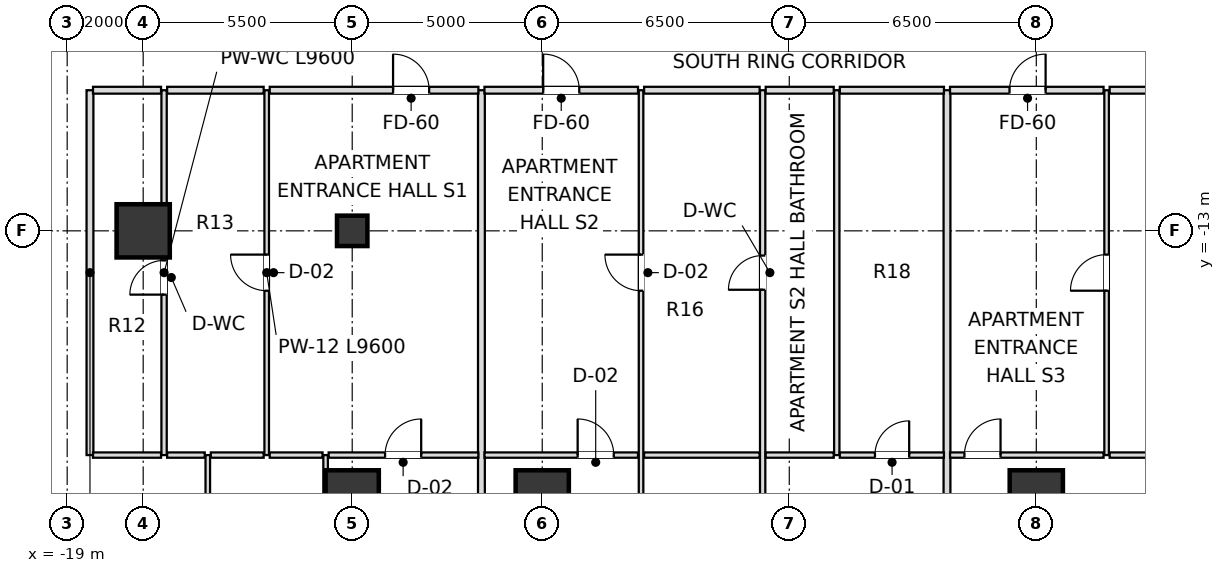
"""IFC4 building model, lengths in metres.
Left out: names, types, materials, properties, quantities, classifications, styles, units other than length and angle.
Written with IfcOpenShell. Run it as: python <this file> out.ifc"""

import sys

from ifc_helpers import new_model, si_unit, direction, frame, frame_2d, origin, origin_2d, place, context, subcontext, project, spatial, rectangle, extrude, element, fill, save


model = new_model("IFC4")
c1 = context("Model", 3, precision=1e-05, world=origin(), true_north=direction((0.0, 1.0)))
c2 = subcontext(c1, "Body", "Model", "MODEL_VIEW")
j1 = project(units=[si_unit("LENGTHUNIT", "METRE"), si_unit("PLANEANGLEUNIT", "RADIAN")], contexts=[c1])
p1 = place(None, origin())
s1 = spatial("IfcSite", under=j1, at=p1, CompositionType="ELEMENT")
p2 = place(p1, origin())
s2 = spatial("IfcBuilding", under=s1, at=p2, CompositionType="ELEMENT")
p3 = place(p2, frame((0.0, 0.0, 27.6)))
s3 = spatial("IfcBuildingStorey", under=s2, at=p3, CompositionType="ELEMENT", Elevation=27.6)
for number, where, z_axis, x_axis in (
    (1, (-11.5, -20.0, 0.0), (0.0, 0.0, 1.0), (1.0, 0.0, 0.0)),
    (2, (-6.5, -20.0, 0.0), (0.0, 0.0, 1.0), (1.0, 0.0, 0.0)),
    (3, (6.5, -20.0, 0.0), (0.0, 0.0, 1.0), (1.0, 0.0, 0.0)),
    (4, (-17.0, -13.0, 0.0), (0.0, 0.0, 1.0), (1.0, 0.0, 0.0)),
):
    element("IfcColumn", number, at=place(p3, frame(where, z_axis=z_axis, x_axis=x_axis)), inside=s3, PredefinedType="USERDEFINED", context=c2, shape_type="SweptSolid", body=[
        extrude(rectangle(XDim=1.4, YDim=1.4, at=origin_2d()), origin(), (0.0, 0.0, 1.0), 4.8),
    ])
p4 = place(p3, frame((-11.5, -13.0, 0.0), z_axis=(0.0, 0.0, 1.0), x_axis=(1.0, 0.0, 0.0)))
e5 = element("IfcColumn", 5, at=p4, inside=s3, PredefinedType="COLUMN", context=c2, shape_type="SweptSolid", body=[
    extrude(rectangle(XDim=0.8, YDim=0.8, at=origin_2d()), origin(), (0.0, 0.0, 1.0), 4.8),
])
p5 = place(p3, frame((-18.4, -18.9, 0.0), z_axis=(0.0, 0.0, 1.0), x_axis=(0.0, 1.0, 0.0)))
e6 = element("IfcWall", 6, at=p5, inside=s3, PredefinedType="PARTITIONING", context=c2, shape_type="SweptSolid", body=[
    extrude(rectangle(XDim=9.6, YDim=0.18, at=frame_2d((4.8, 0.0))), origin(), (0.0, 0.0, 1.0), 3.936),
])
p6 = place(p3, frame((-16.45, -18.9, 0.0), z_axis=(0.0, 0.0, 1.0), x_axis=(0.0, 1.0, 0.0)))
e7 = element("IfcWall", 7, at=p6, inside=s3, PredefinedType="PARTITIONING", context=c2, shape_type="SweptSolid", body=[
    extrude(rectangle(XDim=9.6, YDim=0.14, at=frame_2d((4.8, 0.0))), origin(), (0.0, 0.0, 1.0), 3.936),
])
p7 = place(p6, frame((4.222, 0.0, 0.0)))
e8 = element("IfcOpeningElement", 8, at=p7, cuts=e7, PredefinedType="OPENING", context=c2, shape_type="SweptSolid", body=[
    extrude(rectangle(XDim=0.9, YDim=2.1, at=frame_2d((0.45, 1.05))), frame((0.0, 0.08, 0.0), z_axis=(0.0, -1.0, 0.0), x_axis=(1.0, 0.0, 0.0)), (0.0, 0.0, 1.0), 0.16),
])
p8 = place(p3, frame((-15.3, -24.9, 0.0), z_axis=(0.0, 0.0, 1.0), x_axis=(0.0, 1.0, 0.0)))
e9 = element("IfcWall", 9, at=p8, inside=s3, PredefinedType="PARTITIONING", context=c2, shape_type="SweptSolid", body=[
    extrude(rectangle(XDim=6.0, YDim=0.12, at=frame_2d((3.0, 0.0))), origin(), (0.0, 0.0, 1.0), 3.936),
])
p9 = place(p8, frame((2.55, 0.0, 0.0)))
e10 = element("IfcOpeningElement", 10, at=p9, cuts=e9, PredefinedType="OPENING", context=c2, shape_type="SweptSolid", body=[
    extrude(rectangle(XDim=0.9, YDim=2.1, at=frame_2d((0.45, 1.05))), frame((0.0, 0.07, 0.0), z_axis=(0.0, -1.0, 0.0), x_axis=(1.0, 0.0, 0.0)), (0.0, 0.0, 1.0), 0.14),
])
p10 = place(p3, frame((-13.75, -18.9, 0.0), z_axis=(0.0, 0.0, 1.0), x_axis=(0.0, 1.0, 0.0)))
e11 = element("IfcWall", 11, at=p10, inside=s3, PredefinedType="PARTITIONING", context=c2, shape_type="SweptSolid", body=[
    extrude(rectangle(XDim=9.6, YDim=0.12, at=frame_2d((4.8, 0.0))), origin(), (0.0, 0.0, 1.0), 3.936),
])
p11 = place(p10, frame((4.325, 0.0, 0.0)))
e12 = element("IfcOpeningElement", 12, at=p11, cuts=e11, PredefinedType="OPENING", context=c2, shape_type="SweptSolid", body=[
    extrude(rectangle(XDim=0.95, YDim=2.1, at=frame_2d((0.475, 1.05))), frame((0.0, 0.07, 0.0), z_axis=(0.0, -1.0, 0.0), x_axis=(1.0, 0.0, 0.0)), (0.0, 0.0, 1.0), 0.14),
])
p12 = place(p3, frame((-12.2, -24.9, 0.0), z_axis=(0.0, 0.0, 1.0), x_axis=(0.0, 1.0, 0.0)))
e13 = element("IfcWall", 13, at=p12, inside=s3, PredefinedType="PARTITIONING", context=c2, shape_type="SweptSolid", body=[
    extrude(rectangle(XDim=6.0, YDim=0.12, at=frame_2d((3.0, 0.0))), origin(), (0.0, 0.0, 1.0), 3.936),
])
p13 = place(p12, frame((2.55, 0.0, 0.0)))
e14 = element("IfcOpeningElement", 14, at=p13, cuts=e13, PredefinedType="OPENING", context=c2, shape_type="SweptSolid", body=[
    extrude(rectangle(XDim=0.9, YDim=2.1, at=frame_2d((0.45, 1.05))), frame((0.0, 0.07, 0.0), z_axis=(0.0, -1.0, 0.0), x_axis=(1.0, 0.0, 0.0)), (0.0, 0.0, 1.0), 0.14),
])
p14 = place(p3, frame((-8.1, -24.9, 0.0), z_axis=(0.0, 0.0, 1.0), x_axis=(0.0, 1.0, 0.0)))
e15 = element("IfcWall", 15, at=p14, inside=s3, PredefinedType="PARTITIONING", context=c2, shape_type="SweptSolid", body=[
    extrude(rectangle(XDim=15.6, YDim=0.18, at=frame_2d((7.8, 0.0))), origin(), (0.0, 0.0, 1.0), 4.016),
])
p15 = place(p3, frame((-3.9, -24.9, 0.0), z_axis=(0.0, 0.0, 1.0), x_axis=(0.0, 1.0, 0.0)))
e16 = element("IfcWall", 16, at=p15, inside=s3, PredefinedType="PARTITIONING", context=c2, shape_type="SweptSolid", body=[
    extrude(rectangle(XDim=15.6, YDim=0.12, at=frame_2d((7.8, 0.0))), origin(), (0.0, 0.0, 1.0), 4.016),
])
p16 = place(p15, frame((10.325, 0.0, 0.0)))
e17 = element("IfcOpeningElement", 17, at=p16, cuts=e16, PredefinedType="OPENING", context=c2, shape_type="SweptSolid", body=[
    extrude(rectangle(XDim=0.95, YDim=2.1, at=frame_2d((0.475, 1.05))), frame((0.0, 0.07, 0.0), z_axis=(0.0, -1.0, 0.0), x_axis=(1.0, 0.0, 0.0)), (0.0, 0.0, 1.0), 0.14),
])
p17 = place(p15, frame((2.55, 0.0, 0.0)))
e18 = element("IfcOpeningElement", 18, at=p17, cuts=e16, PredefinedType="OPENING", context=c2, shape_type="SweptSolid", body=[
    extrude(rectangle(XDim=0.9, YDim=2.1, at=frame_2d((0.45, 1.05))), frame((0.0, 0.07, 0.0), z_axis=(0.0, -1.0, 0.0), x_axis=(1.0, 0.0, 0.0)), (0.0, 0.0, 1.0), 0.14),
])
p18 = place(p3, frame((-0.7, -24.9, 0.0), z_axis=(0.0, 0.0, 1.0), x_axis=(0.0, 1.0, 0.0)))
e19 = element("IfcWall", 19, at=p18, inside=s3, PredefinedType="PARTITIONING", context=c2, shape_type="SweptSolid", body=[
    extrude(rectangle(XDim=15.6, YDim=0.14, at=frame_2d((7.8, 0.0))), origin(), (0.0, 0.0, 1.0), 4.016),
])
p19 = place(p18, frame((10.35, 0.0, 0.0)))
e20 = element("IfcOpeningElement", 20, at=p19, cuts=e19, PredefinedType="OPENING", context=c2, shape_type="SweptSolid", body=[
    extrude(rectangle(XDim=0.9, YDim=2.1, at=frame_2d((0.45, 1.05))), frame((0.0, 0.08, 0.0), z_axis=(0.0, -1.0, 0.0), x_axis=(1.0, 0.0, 0.0)), (0.0, 0.0, 1.0), 0.16),
])
p20 = place(p18, frame((2.55, 0.0, 0.0)))
e21 = element("IfcOpeningElement", 21, at=p20, cuts=e19, PredefinedType="OPENING", context=c2, shape_type="SweptSolid", body=[
    extrude(rectangle(XDim=0.9, YDim=2.1, at=frame_2d((0.45, 1.05))), frame((0.0, 0.08, 0.0), z_axis=(0.0, -1.0, 0.0), x_axis=(1.0, 0.0, 0.0)), (0.0, 0.0, 1.0), 0.16),
])
p21 = place(p3, frame((1.25, -18.9, 0.0), z_axis=(0.0, 0.0, 1.0), x_axis=(0.0, 1.0, 0.0)))
e22 = element("IfcWall", 22, at=p21, inside=s3, PredefinedType="PARTITIONING", context=c2, shape_type="SweptSolid", body=[
    extrude(rectangle(XDim=9.6, YDim=0.14, at=frame_2d((4.8, 0.0))), origin(), (0.0, 0.0, 1.0), 4.148),
])
p22 = place(p3, frame((4.15, -24.9, 0.0), z_axis=(0.0, 0.0, 1.0), x_axis=(0.0, 1.0, 0.0)))
e23 = element("IfcWall", 23, at=p22, inside=s3, PredefinedType="PARTITIONING", context=c2, shape_type="SweptSolid", body=[
    extrude(rectangle(XDim=15.6, YDim=0.18, at=frame_2d((7.8, 0.0))), origin(), (0.0, 0.0, 1.0), 4.016),
])
p23 = place(p3, frame((8.35, -18.9, 0.0), z_axis=(0.0, 0.0, 1.0), x_axis=(0.0, 1.0, 0.0)))
e24 = element("IfcWall", 24, at=p23, inside=s3, PredefinedType="PARTITIONING", context=c2, shape_type="SweptSolid", body=[
    extrude(rectangle(XDim=9.6, YDim=0.12, at=frame_2d((4.8, 0.0))), origin(), (0.0, 0.0, 1.0), 4.016),
])
p24 = place(p23, frame((4.325, 0.0, 0.0)))
e25 = element("IfcOpeningElement", 25, at=p24, cuts=e24, PredefinedType="OPENING", context=c2, shape_type="SweptSolid", body=[
    extrude(rectangle(XDim=0.95, YDim=2.1, at=frame_2d((0.475, 1.05))), frame((0.0, 0.07, 0.0), z_axis=(0.0, -1.0, 0.0), x_axis=(1.0, 0.0, 0.0)), (0.0, 0.0, 1.0), 0.14),
])
p25 = place(p3, frame((-18.32, -18.9, 0.0), z_axis=(0.0, 0.0, 1.0), x_axis=(1.0, 0.0, 0.0)))
e26 = element("IfcWall", 26, at=p25, inside=s3, PredefinedType="PARTITIONING", context=c2, shape_type="SweptSolid", body=[
    extrude(rectangle(XDim=1.79, YDim=0.14, at=frame_2d((0.895, 0.0))), origin(), (0.0, 0.0, 1.0), 3.936),
])
p26 = place(p3, frame((-16.37, -18.9, 0.0), z_axis=(0.0, 0.0, 1.0), x_axis=(1.0, 0.0, 0.0)))
e27 = element("IfcWall", 27, at=p26, inside=s3, PredefinedType="PARTITIONING", context=c2, shape_type="SweptSolid", body=[
    extrude(rectangle(XDim=0.99, YDim=0.14, at=frame_2d((0.495, 0.0))), origin(), (0.0, 0.0, 1.0), 3.936),
])
for number, where, z_axis, x_axis in (
    (28, (-15.22, -18.9, 0.0), (0.0, 0.0, 1.0), (1.0, 0.0, 0.0)),
    (29, (-13.67, -18.9, 0.0), (0.0, 0.0, 1.0), (1.0, 0.0, 0.0)),
):
    element("IfcWall", number, at=place(p3, frame(where, z_axis=z_axis, x_axis=x_axis)), inside=s3, PredefinedType="PARTITIONING", context=c2, shape_type="SweptSolid", body=[
        extrude(rectangle(XDim=1.39, YDim=0.14, at=frame_2d((0.695, 0.0))), origin(), (0.0, 0.0, 1.0), 3.936),
    ])
p27 = place(p3, frame((-12.12, -18.9, 0.0), z_axis=(0.0, 0.0, 1.0), x_axis=(1.0, 0.0, 0.0)))
e30 = element("IfcWall", 30, at=p27, inside=s3, PredefinedType="PARTITIONING", context=c2, shape_type="SweptSolid", body=[
    extrude(rectangle(XDim=3.94, YDim=0.14, at=frame_2d((1.97, 0.0))), origin(), (0.0, 0.0, 1.0), 3.936),
])
p28 = place(p27, frame((1.485, 0.0, 0.0)))
e31 = element("IfcOpeningElement", 31, at=p28, cuts=e30, PredefinedType="OPENING", context=c2, shape_type="SweptSolid", body=[
    extrude(rectangle(XDim=0.95, YDim=2.1, at=frame_2d((0.475, 1.05))), frame((0.0, 0.08, 0.0), z_axis=(0.0, -1.0, 0.0), x_axis=(1.0, 0.0, 0.0)), (0.0, 0.0, 1.0), 0.16),
])
p29 = place(p3, frame((-8.02, -18.9, 0.0), z_axis=(0.0, 0.0, 1.0), x_axis=(1.0, 0.0, 0.0)))
e32 = element("IfcWall", 32, at=p29, inside=s3, PredefinedType="PARTITIONING", context=c2, shape_type="SweptSolid", body=[
    extrude(rectangle(XDim=4.04, YDim=0.14, at=frame_2d((2.02, 0.0))), origin(), (0.0, 0.0, 1.0), 4.016),
])
p30 = place(p29, frame((2.452, 0.0, 0.0)))
e33 = element("IfcOpeningElement", 33, at=p30, cuts=e32, PredefinedType="OPENING", context=c2, shape_type="SweptSolid", body=[
    extrude(rectangle(XDim=0.95, YDim=2.1, at=frame_2d((0.475, 1.05))), frame((0.0, 0.08, 0.0), z_axis=(0.0, -1.0, 0.0), x_axis=(1.0, 0.0, 0.0)), (0.0, 0.0, 1.0), 0.16),
])
p31 = place(p3, frame((-3.82, -18.9, 0.0), z_axis=(0.0, 0.0, 1.0), x_axis=(1.0, 0.0, 0.0)))
e34 = element("IfcWall", 34, at=p31, inside=s3, PredefinedType="PARTITIONING", context=c2, shape_type="SweptSolid", body=[
    extrude(rectangle(XDim=3.04, YDim=0.14, at=frame_2d((1.52, 0.0))), origin(), (0.0, 0.0, 1.0), 4.58),
])
p32 = place(p3, frame((-0.62, -18.9, 0.0), z_axis=(0.0, 0.0, 1.0), x_axis=(1.0, 0.0, 0.0)))
e35 = element("IfcWall", 35, at=p32, inside=s3, PredefinedType="PARTITIONING", context=c2, shape_type="SweptSolid", body=[
    extrude(rectangle(XDim=1.79, YDim=0.14, at=frame_2d((0.895, 0.0))), origin(), (0.0, 0.0, 1.0), 4.58),
])
p33 = place(p3, frame((1.33, -18.9, 0.0), z_axis=(0.0, 0.0, 1.0), x_axis=(1.0, 0.0, 0.0)))
e36 = element("IfcWall", 36, at=p33, inside=s3, PredefinedType="PARTITIONING", context=c2, shape_type="SweptSolid", body=[
    extrude(rectangle(XDim=2.74, YDim=0.14, at=frame_2d((1.37, 0.0))), origin(), (0.0, 0.0, 1.0), 4.58),
])
p34 = place(p33, frame((0.925, 0.0, 0.0)))
e37 = element("IfcOpeningElement", 37, at=p34, cuts=e36, PredefinedType="OPENING", context=c2, shape_type="SweptSolid", body=[
    extrude(rectangle(XDim=0.9, YDim=2.1, at=frame_2d((0.45, 1.05))), frame((0.0, 0.08, 0.0), z_axis=(0.0, -1.0, 0.0), x_axis=(1.0, 0.0, 0.0)), (0.0, 0.0, 1.0), 0.16),
])
p35 = place(p3, frame((4.23, -18.9, 0.0), z_axis=(0.0, 0.0, 1.0), x_axis=(1.0, 0.0, 0.0)))
e38 = element("IfcWall", 38, at=p35, inside=s3, PredefinedType="PARTITIONING", context=c2, shape_type="SweptSolid", body=[
    extrude(rectangle(XDim=4.04, YDim=0.14, at=frame_2d((2.02, 0.0))), origin(), (0.0, 0.0, 1.0), 4.016),
])
p36 = place(p35, frame((0.379, 0.0, 0.0)))
e39 = element("IfcOpeningElement", 39, at=p36, cuts=e38, PredefinedType="OPENING", context=c2, shape_type="SweptSolid", body=[
    extrude(rectangle(XDim=0.95, YDim=2.1, at=frame_2d((0.475, 1.05))), frame((0.0, 0.08, 0.0), z_axis=(0.0, -1.0, 0.0), x_axis=(1.0, 0.0, 0.0)), (0.0, 0.0, 1.0), 0.16),
])
p37 = place(p3, frame((8.43, -18.9, 0.0), z_axis=(0.0, 0.0, 1.0), x_axis=(1.0, 0.0, 0.0)))
e40 = element("IfcWall", 40, at=p37, inside=s3, PredefinedType="PARTITIONING", context=c2, shape_type="SweptSolid", body=[
    extrude(rectangle(XDim=1.34, YDim=0.14, at=frame_2d((0.67, 0.0))), origin(), (0.0, 0.0, 1.0), 4.58),
])
p38 = place(p3, frame((-18.32, -9.3, 0.0), z_axis=(0.0, 0.0, 1.0), x_axis=(1.0, 0.0, 0.0)))
e41 = element("IfcWall", 41, at=p38, inside=s3, PredefinedType="PARTITIONING", context=c2, shape_type="SweptSolid", body=[
    extrude(rectangle(XDim=1.79, YDim=0.18, at=frame_2d((0.895, 0.0))), origin(), (0.0, 0.0, 1.0), 4.016),
])
p39 = place(p3, frame((-16.37, -9.3, 0.0), z_axis=(0.0, 0.0, 1.0), x_axis=(1.0, 0.0, 0.0)))
e42 = element("IfcWall", 42, at=p39, inside=s3, PredefinedType="PARTITIONING", context=c2, shape_type="SweptSolid", body=[
    extrude(rectangle(XDim=2.54, YDim=0.18, at=frame_2d((1.27, 0.0))), origin(), (0.0, 0.0, 1.0), 4.58),
])
p40 = place(p3, frame((-13.67, -9.3, 0.0), z_axis=(0.0, 0.0, 1.0), x_axis=(1.0, 0.0, 0.0)))
e43 = element("IfcWall", 43, at=p40, inside=s3, PredefinedType="PARTITIONING", context=c2, shape_type="SweptSolid", body=[
    extrude(rectangle(XDim=5.49, YDim=0.18, at=frame_2d((2.745, 0.0))), origin(), (0.0, 0.0, 1.0), 4.58),
])
p41 = place(p40, frame((3.245, 0.0, 0.0)))
e44 = element("IfcOpeningElement", 44, at=p41, cuts=e43, PredefinedType="OPENING", context=c2, shape_type="SweptSolid", body=[
    extrude(rectangle(XDim=0.95, YDim=2.15, at=frame_2d((0.475, 1.075))), frame((0.0, 0.1, 0.0), z_axis=(0.0, -1.0, 0.0), x_axis=(1.0, 0.0, 0.0)), (0.0, 0.0, 1.0), 0.2),
])
p42 = place(p3, frame((-8.02, -9.3, 0.0), z_axis=(0.0, 0.0, 1.0), x_axis=(1.0, 0.0, 0.0)))
e45 = element("IfcWall", 45, at=p42, inside=s3, PredefinedType="PARTITIONING", context=c2, shape_type="SweptSolid", body=[
    extrude(rectangle(XDim=4.04, YDim=0.18, at=frame_2d((2.02, 0.0))), origin(), (0.0, 0.0, 1.0), 4.016),
])
p43 = place(p42, frame((1.545, 0.0, 0.0)))
e46 = element("IfcOpeningElement", 46, at=p43, cuts=e45, PredefinedType="OPENING", context=c2, shape_type="SweptSolid", body=[
    extrude(rectangle(XDim=0.95, YDim=2.15, at=frame_2d((0.475, 1.075))), frame((0.0, 0.1, 0.0), z_axis=(0.0, -1.0, 0.0), x_axis=(1.0, 0.0, 0.0)), (0.0, 0.0, 1.0), 0.2),
])
p44 = place(p3, frame((-3.82, -9.3, 0.0), z_axis=(0.0, 0.0, 1.0), x_axis=(1.0, 0.0, 0.0)))
e47 = element("IfcWall", 47, at=p44, inside=s3, PredefinedType="PARTITIONING", context=c2, shape_type="SweptSolid", body=[
    extrude(rectangle(XDim=3.04, YDim=0.18, at=frame_2d((1.52, 0.0))), origin(), (0.0, 0.0, 1.0), 4.58),
])
p45 = place(p3, frame((-0.62, -9.3, 0.0), z_axis=(0.0, 0.0, 1.0), x_axis=(1.0, 0.0, 0.0)))
e48 = element("IfcWall", 48, at=p45, inside=s3, PredefinedType="PARTITIONING", context=c2, shape_type="SweptSolid", body=[
    extrude(rectangle(XDim=1.79, YDim=0.18, at=frame_2d((0.895, 0.0))), origin(), (0.0, 0.0, 1.0), 4.58),
])
p46 = place(p3, frame((1.33, -9.3, 0.0), z_axis=(0.0, 0.0, 1.0), x_axis=(1.0, 0.0, 0.0)))
e49 = element("IfcWall", 49, at=p46, inside=s3, PredefinedType="PARTITIONING", context=c2, shape_type="SweptSolid", body=[
    extrude(rectangle(XDim=2.74, YDim=0.18, at=frame_2d((1.37, 0.0))), origin(), (0.0, 0.0, 1.0), 4.58),
])
p47 = place(p3, frame((4.23, -9.3, 0.0), z_axis=(0.0, 0.0, 1.0), x_axis=(1.0, 0.0, 0.0)))
e50 = element("IfcWall", 50, at=p47, inside=s3, PredefinedType="PARTITIONING", context=c2, shape_type="SweptSolid", body=[
    extrude(rectangle(XDim=4.04, YDim=0.18, at=frame_2d((2.02, 0.0))), origin(), (0.0, 0.0, 1.0), 4.016),
])
p48 = place(p47, frame((1.565, 0.0, 0.0)))
e51 = element("IfcOpeningElement", 51, at=p48, cuts=e50, PredefinedType="OPENING", context=c2, shape_type="SweptSolid", body=[
    extrude(rectangle(XDim=0.95, YDim=2.15, at=frame_2d((0.475, 1.075))), frame((0.0, 0.1, 0.0), z_axis=(0.0, -1.0, 0.0), x_axis=(1.0, 0.0, 0.0)), (0.0, 0.0, 1.0), 0.2),
])
p49 = place(p3, frame((8.43, -9.3, 0.0), z_axis=(0.0, 0.0, 1.0), x_axis=(1.0, 0.0, 0.0)))
e52 = element("IfcWall", 52, at=p49, inside=s3, PredefinedType="PARTITIONING", context=c2, shape_type="SweptSolid", body=[
    extrude(rectangle(XDim=3.04, YDim=0.18, at=frame_2d((1.52, 0.0))), origin(), (0.0, 0.0, 1.0), 4.58),
])
p50 = place(p41, origin())
e53 = element("IfcDoor", 53, at=p50, inside=s3, OperationType="SINGLE_SWING_LEFT", PredefinedType="DOOR", context=c2, shape_type="SweptSolid", body=[
    extrude(rectangle(XDim=0.95, YDim=2.15, at=frame_2d((0.475, 1.075))), frame((0.0, 0.025, 0.0), z_axis=(0.0, -1.0, 0.0), x_axis=(1.0, 0.0, 0.0)), (0.0, 0.0, 1.0), 0.05),
])
fill(e44, e53)
p51 = place(p11, origin())
e54 = element("IfcDoor", 54, at=p51, inside=s3, OperationType="SINGLE_SWING_RIGHT", PredefinedType="DOOR", context=c2, shape_type="SweptSolid", body=[
    extrude(rectangle(XDim=0.95, YDim=2.1, at=frame_2d((0.475, 1.05))), frame((0.0, 0.025, 0.0), z_axis=(0.0, -1.0, 0.0), x_axis=(1.0, 0.0, 0.0)), (0.0, 0.0, 1.0), 0.05),
])
fill(e12, e54)
p52 = place(p7, origin())
e55 = element("IfcDoor", 55, at=p52, inside=s3, OperationType="SINGLE_SWING_LEFT", PredefinedType="DOOR", context=c2, shape_type="SweptSolid", body=[
    extrude(rectangle(XDim=0.9, YDim=2.1, at=frame_2d((0.45, 1.05))), frame((0.0, 0.025, 0.0), z_axis=(0.0, -1.0, 0.0), x_axis=(1.0, 0.0, 0.0)), (0.0, 0.0, 1.0), 0.05),
])
fill(e8, e55)
p53 = place(p28, origin())
e56 = element("IfcDoor", 56, at=p53, inside=s3, OperationType="SINGLE_SWING_RIGHT", PredefinedType="DOOR", context=c2, shape_type="SweptSolid", body=[
    extrude(rectangle(XDim=0.95, YDim=2.1, at=frame_2d((0.475, 1.05))), frame((0.0, 0.025, 0.0), z_axis=(0.0, -1.0, 0.0), x_axis=(1.0, 0.0, 0.0)), (0.0, 0.0, 1.0), 0.05),
])
fill(e31, e56)
p54 = place(p43, origin())
e57 = element("IfcDoor", 57, at=p54, inside=s3, OperationType="SINGLE_SWING_LEFT", PredefinedType="DOOR", context=c2, shape_type="SweptSolid", body=[
    extrude(rectangle(XDim=0.95, YDim=2.15, at=frame_2d((0.475, 1.075))), frame((0.0, 0.025, 0.0), z_axis=(0.0, -1.0, 0.0), x_axis=(1.0, 0.0, 0.0)), (0.0, 0.0, 1.0), 0.05),
])
fill(e46, e57)
p55 = place(p16, origin())
e58 = element("IfcDoor", 58, at=p55, inside=s3, OperationType="SINGLE_SWING_RIGHT", PredefinedType="DOOR", context=c2, shape_type="SweptSolid", body=[
    extrude(rectangle(XDim=0.95, YDim=2.1, at=frame_2d((0.475, 1.05))), frame((0.0, 0.025, 0.0), z_axis=(0.0, -1.0, 0.0), x_axis=(1.0, 0.0, 0.0)), (0.0, 0.0, 1.0), 0.05),
])
fill(e17, e58)
p56 = place(p19, origin())
e59 = element("IfcDoor", 59, at=p56, inside=s3, OperationType="SINGLE_SWING_LEFT", PredefinedType="DOOR", context=c2, shape_type="SweptSolid", body=[
    extrude(rectangle(XDim=0.9, YDim=2.1, at=frame_2d((0.45, 1.05))), frame((0.0, 0.025, 0.0), z_axis=(0.0, -1.0, 0.0), x_axis=(1.0, 0.0, 0.0)), (0.0, 0.0, 1.0), 0.05),
])
fill(e20, e59)
p57 = place(p34, origin())
e60 = element("IfcDoor", 60, at=p57, inside=s3, OperationType="SINGLE_SWING_RIGHT", PredefinedType="DOOR", context=c2, shape_type="SweptSolid", body=[
    extrude(rectangle(XDim=0.9, YDim=2.1, at=frame_2d((0.45, 1.05))), frame((0.0, 0.025, 0.0), z_axis=(0.0, -1.0, 0.0), x_axis=(1.0, 0.0, 0.0)), (0.0, 0.0, 1.0), 0.05),
])
fill(e37, e60)
p58 = place(p30, origin())
e61 = element("IfcDoor", 61, at=p58, inside=s3, OperationType="SINGLE_SWING_LEFT", PredefinedType="DOOR", context=c2, shape_type="SweptSolid", body=[
    extrude(rectangle(XDim=0.95, YDim=2.1, at=frame_2d((0.475, 1.05))), frame((0.0, 0.025, 0.0), z_axis=(0.0, -1.0, 0.0), x_axis=(1.0, 0.0, 0.0)), (0.0, 0.0, 1.0), 0.05),
])
fill(e33, e61)
p59 = place(p48, origin())
e62 = element("IfcDoor", 62, at=p59, inside=s3, OperationType="SINGLE_SWING_RIGHT", PredefinedType="DOOR", context=c2, shape_type="SweptSolid", body=[
    extrude(rectangle(XDim=0.95, YDim=2.15, at=frame_2d((0.475, 1.075))), frame((0.0, 0.025, 0.0), z_axis=(0.0, -1.0, 0.0), x_axis=(1.0, 0.0, 0.0)), (0.0, 0.0, 1.0), 0.05),
])
fill(e51, e62)
p60 = place(p24, origin())
e63 = element("IfcDoor", 63, at=p60, inside=s3, OperationType="SINGLE_SWING_LEFT", PredefinedType="DOOR", context=c2, shape_type="SweptSolid", body=[
    extrude(rectangle(XDim=0.95, YDim=2.1, at=frame_2d((0.475, 1.05))), frame((0.0, 0.025, 0.0), z_axis=(0.0, -1.0, 0.0), x_axis=(1.0, 0.0, 0.0)), (0.0, 0.0, 1.0), 0.05),
])
fill(e25, e63)
p61 = place(p36, origin())
e64 = element("IfcDoor", 64, at=p61, inside=s3, OperationType="SINGLE_SWING_RIGHT", PredefinedType="DOOR", context=c2, shape_type="SweptSolid", body=[
    extrude(rectangle(XDim=0.95, YDim=2.1, at=frame_2d((0.475, 1.05))), frame((0.0, 0.025, 0.0), z_axis=(0.0, -1.0, 0.0), x_axis=(1.0, 0.0, 0.0)), (0.0, 0.0, 1.0), 0.05),
])
fill(e39, e64)
save(model, sys.argv[1])
